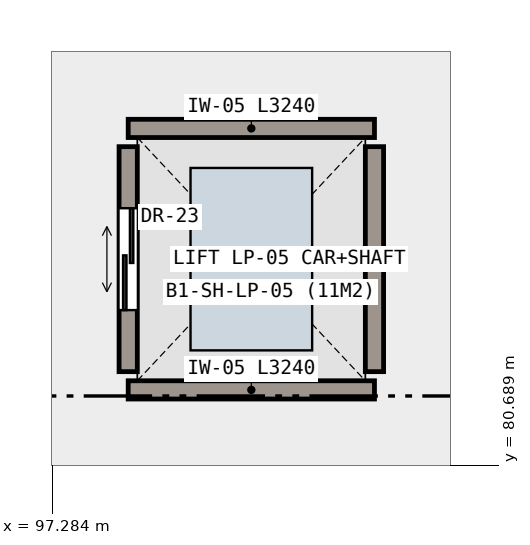
"""IFC4 building model, lengths in metres.
Left out: names, types, materials, properties, quantities, classifications, styles, units other than length and angle.
Written with IfcOpenShell. Run it as: python <this file> out.ifc"""

import sys

from ifc_helpers import new_model, si_unit, direction, frame, frame_2d, origin, place, context, subcontext, project, spatial, rectangle, extrude, element, fill, save


model = new_model("IFC4")
c1 = context("Model", 3, precision=1e-05, world=origin(), true_north=direction((0.0, 1.0)))
c2 = subcontext(c1, "Body", "Model", "MODEL_VIEW")
j1 = project(units=[si_unit("LENGTHUNIT", "METRE"), si_unit("PLANEANGLEUNIT", "RADIAN")], contexts=[c1])
p1 = place(None, origin())
s1 = spatial("IfcSite", under=j1, at=p1, CompositionType="ELEMENT")
p2 = place(p1, origin())
s2 = spatial("IfcBuilding", under=s1, at=p2, CompositionType="ELEMENT")
p3 = place(p2, frame((0.0, 0.0, -4.8)))
s3 = spatial("IfcBuildingStorey", under=s2, at=p3, CompositionType="ELEMENT", Elevation=-4.8)
for number, where, z_axis, x_axis in (
    (1, (101.52, 81.68, 0.0), (0.0, 0.0, 1.0), (-1.0, 0.0, 0.0)),
    (2, (98.28, 85.12, 0.0), (0.0, 0.0, 1.0), (1.0, 0.0, 0.0)),
):
    element("IfcWall", number, at=place(p3, frame(where, z_axis=z_axis, x_axis=x_axis)), inside=s3, PredefinedType="SHEAR", context=c2, shape_type="SweptSolid", body=[
        extrude(rectangle(XDim=3.24, YDim=0.24, at=frame_2d((1.62, 0.0))), origin(), (0.0, 0.0, 1.0), 4.48),
    ])
p4 = place(p3, frame((98.28, 81.92, 0.0), z_axis=(0.0, 0.0, 1.0), x_axis=(0.0, 1.0, 0.0)))
e3 = element("IfcWall", 3, at=p4, inside=s3, PredefinedType="SHEAR", context=c2, shape_type="SweptSolid", body=[
    extrude(rectangle(XDim=2.96, YDim=0.24, at=frame_2d((1.48, 0.0))), origin(), (0.0, 0.0, 1.0), 4.48),
])
p5 = place(p4, frame((0.81, 0.0, 0.0)))
e4 = element("IfcOpeningElement", 4, at=p5, cuts=e3, PredefinedType="OPENING", context=c2, shape_type="SweptSolid", body=[
    extrude(rectangle(XDim=1.34, YDim=2.18, at=frame_2d((0.67, 1.09))), frame((0.0, 0.13, 0.0), z_axis=(0.0, -1.0, 0.0), x_axis=(1.0, 0.0, 0.0)), (0.0, 0.0, 1.0), 0.26),
])
p6 = place(p3, frame((101.52, 84.88, 0.0), z_axis=(0.0, 0.0, 1.0), x_axis=(0.0, -1.0, 0.0)))
e5 = element("IfcWall", 5, at=p6, inside=s3, PredefinedType="SHEAR", context=c2, shape_type="SweptSolid", body=[
    extrude(rectangle(XDim=2.96, YDim=0.24, at=frame_2d((1.48, 0.0))), origin(), (0.0, 0.0, 1.0), 4.48),
])
p7 = place(p5, origin())
e6 = element("IfcDoor", 6, at=p7, inside=s3, OperationType="DOUBLE_DOOR_SLIDING", PredefinedType="DOOR", context=c2, shape_type="SweptSolid", body=[
    extrude(rectangle(XDim=1.34, YDim=2.18, at=frame_2d((0.67, 1.09))), frame((0.0, 0.025, 0.0), z_axis=(0.0, -1.0, 0.0), x_axis=(1.0, 0.0, 0.0)), (0.0, 0.0, 1.0), 0.05),
])
fill(e4, e6)
save(model, sys.argv[1])
